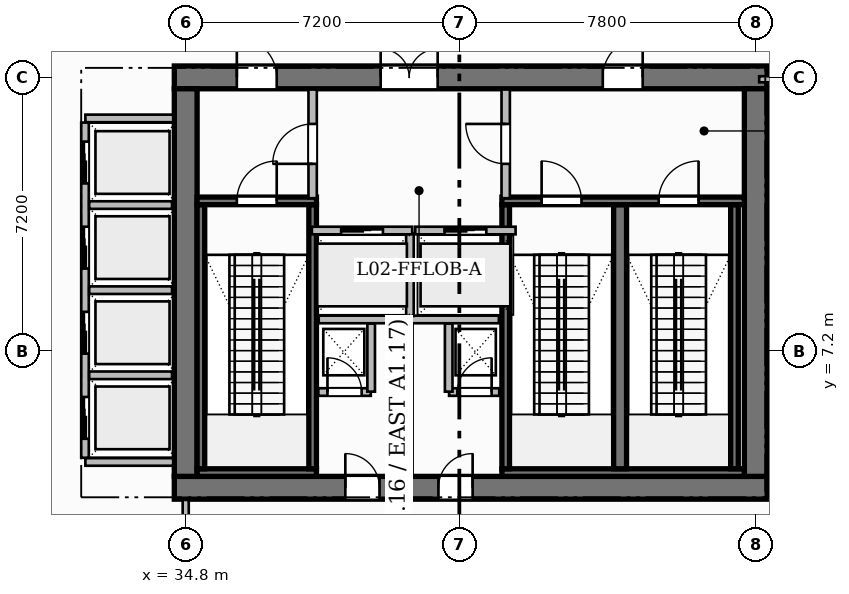
"""IFC4 building model, lengths in metres.
Left out: names, types, materials, properties, quantities, classifications, styles, units other than length and angle.
Written with IfcOpenShell. Run it as: python <this file> out.ifc"""

import sys

from ifc_helpers import new_model, si_unit, direction, frame, frame_2d, origin, place, context, subcontext, project, spatial, rectangle, extrude, source, transform, mapped, element, fill, save


model = new_model("IFC4")
c1 = context("Model", 3, precision=1e-05, world=origin(), true_north=direction((0.0, 1.0)))
c2 = subcontext(c1, "Body", "Model", "MODEL_VIEW")
j1 = project(units=[si_unit("LENGTHUNIT", "METRE"), si_unit("PLANEANGLEUNIT", "RADIAN")], contexts=[c1])
p1 = place(None, origin())
s1 = spatial("IfcSite", under=j1, at=p1, CompositionType="ELEMENT")
p2 = place(p1, origin())
s2 = spatial("IfcBuilding", under=s1, at=p2, CompositionType="ELEMENT")
p3 = place(p2, frame((0.0, 0.0, 10.8)))
s3 = spatial("IfcBuildingStorey", under=s2, at=p3, CompositionType="ELEMENT", Elevation=10.8)
p4 = place(p3, frame((34.5, 3.6, 0.0), z_axis=(0.0, 0.0, 1.0), x_axis=(1.0, 0.0, 0.0)))
e1 = element("IfcWall", 1, at=p4, inside=s3, PredefinedType="SHEAR", context=c2, shape_type="SweptSolid", body=[
    extrude(rectangle(XDim=15.6, YDim=0.6, at=frame_2d((7.8, 0.0))), origin(), (0.0, 0.0, 1.0), 5.4),
])
p5 = place(p4, frame((4.5, 0.0, 0.0)))
e2 = element("IfcOpeningElement", 2, at=p5, cuts=e1, PredefinedType="OPENING", context=c2, shape_type="SweptSolid", body=[
    extrude(rectangle(XDim=0.9, YDim=2.1, at=frame_2d((0.45, 1.05))), frame((0.0, 0.31, 0.0), z_axis=(0.0, -1.0, 0.0), x_axis=(1.0, 0.0, 0.0)), (0.0, 0.0, 1.0), 0.62),
])
p6 = place(p4, frame((6.95, 0.0, 0.0)))
e3 = element("IfcOpeningElement", 3, at=p6, cuts=e1, PredefinedType="OPENING", context=c2, shape_type="SweptSolid", body=[
    extrude(rectangle(XDim=0.9, YDim=2.1, at=frame_2d((0.45, 1.05))), frame((0.0, 0.31, 0.0), z_axis=(0.0, -1.0, 0.0), x_axis=(1.0, 0.0, 0.0)), (0.0, 0.0, 1.0), 0.62),
])
p7 = place(p3, frame((34.5, 14.4, 0.0), z_axis=(0.0, 0.0, 1.0), x_axis=(1.0, 0.0, 0.0)))
e4 = element("IfcWall", 4, at=p7, inside=s3, PredefinedType="SHEAR", context=c2, shape_type="SweptSolid", body=[
    extrude(rectangle(XDim=15.6, YDim=0.6, at=frame_2d((7.8, 0.0))), origin(), (0.0, 0.0, 1.0), 5.4),
])
p8 = place(p7, frame((5.43, 0.0, 0.0)))
e5 = element("IfcOpeningElement", 5, at=p8, cuts=e4, PredefinedType="OPENING", context=c2, shape_type="SweptSolid", body=[
    extrude(rectangle(XDim=1.5, YDim=2.2, at=frame_2d((0.75, 1.1))), frame((0.0, 0.31, 0.0), z_axis=(0.0, -1.0, 0.0), x_axis=(1.0, 0.0, 0.0)), (0.0, 0.0, 1.0), 0.62),
])
p9 = place(p7, frame((1.645, 0.0, 0.0)))
e6 = element("IfcOpeningElement", 6, at=p9, cuts=e4, PredefinedType="OPENING", context=c2, shape_type="SweptSolid", body=[
    extrude(rectangle(XDim=1.05, YDim=2.15, at=frame_2d((0.525, 1.075))), frame((0.0, 0.31, 0.0), z_axis=(0.0, -1.0, 0.0), x_axis=(1.0, 0.0, 0.0)), (0.0, 0.0, 1.0), 0.62),
])
p10 = place(p7, frame((11.275, 0.0, 0.0)))
e7 = element("IfcOpeningElement", 7, at=p10, cuts=e4, PredefinedType="OPENING", context=c2, shape_type="SweptSolid", body=[
    extrude(rectangle(XDim=1.05, YDim=2.15, at=frame_2d((0.525, 1.075))), frame((0.0, 0.31, 0.0), z_axis=(0.0, -1.0, 0.0), x_axis=(1.0, 0.0, 0.0)), (0.0, 0.0, 1.0), 0.62),
])
for number, where, z_axis, x_axis in (
    (8, (34.8, 3.9, 0.0), (0.0, 0.0, 1.0), (0.0, 1.0, 0.0)),
    (9, (49.8, 3.9, 0.0), (0.0, 0.0, 1.0), (0.0, 1.0, 0.0)),
):
    element("IfcWall", number, at=place(p3, frame(where, z_axis=z_axis, x_axis=x_axis)), inside=s3, PredefinedType="SHEAR", context=c2, shape_type="SweptSolid", body=[
        extrude(rectangle(XDim=10.2, YDim=0.6, at=frame_2d((5.1, 0.0))), origin(), (0.0, 0.0, 1.0), 5.4),
    ])
p11 = place(p3, frame((35.1, 4.0, 0.0), z_axis=(0.0, 0.0, 1.0), x_axis=(1.0, 0.0, 0.0)))
e10 = element("IfcWall", 10, at=p11, inside=s3, PredefinedType="SHEAR", context=c2, shape_type="SweptSolid", body=[
    extrude(rectangle(XDim=3.14, YDim=0.2, at=frame_2d((1.57, 0.0))), origin(), (0.0, 0.0, 1.0), 5.4),
])
for number, where, z_axis, x_axis in (
    (11, (35.2, 4.1, 0.0), (0.0, 0.0, 1.0), (0.0, 1.0, 0.0)),
    (12, (38.14, 4.1, 0.0), (0.0, 0.0, 1.0), (0.0, 1.0, 0.0)),
):
    element("IfcWall", number, at=place(p3, frame(where, z_axis=z_axis, x_axis=x_axis)), inside=s3, PredefinedType="SHEAR", context=c2, shape_type="SweptSolid", body=[
        extrude(rectangle(XDim=6.95, YDim=0.2, at=frame_2d((3.475, 0.0))), origin(), (0.0, 0.0, 1.0), 5.4),
    ])
p12 = place(p3, frame((35.1, 11.15, 0.0), z_axis=(0.0, 0.0, 1.0), x_axis=(1.0, 0.0, 0.0)))
e13 = element("IfcWall", 13, at=p12, inside=s3, PredefinedType="SHEAR", context=c2, shape_type="SweptSolid", body=[
    extrude(rectangle(XDim=3.14, YDim=0.2, at=frame_2d((1.57, 0.0))), origin(), (0.0, 0.0, 1.0), 5.4),
])
p13 = place(p12, frame((1.045, 0.0, 0.0)))
e14 = element("IfcOpeningElement", 14, at=p13, cuts=e13, PredefinedType="OPENING", context=c2, shape_type="SweptSolid", body=[
    extrude(rectangle(XDim=1.05, YDim=2.2, at=frame_2d((0.525, 1.1))), frame((0.0, 0.11, 0.0), z_axis=(0.0, -1.0, 0.0), x_axis=(1.0, 0.0, 0.0)), (0.0, 0.0, 1.0), 0.22),
])
p14 = place(p3, frame((43.12, 4.0, 0.0), z_axis=(0.0, 0.0, 1.0), x_axis=(1.0, 0.0, 0.0)))
e15 = element("IfcWall", 15, at=p14, inside=s3, PredefinedType="SHEAR", context=c2, shape_type="SweptSolid", body=[
    extrude(rectangle(XDim=6.38, YDim=0.2, at=frame_2d((3.19, 0.0))), origin(), (0.0, 0.0, 1.0), 5.4),
])
p15 = place(p3, frame((43.22, 4.1, 0.0), z_axis=(0.0, 0.0, 1.0), x_axis=(0.0, 1.0, 0.0)))
e16 = element("IfcWall", 16, at=p15, inside=s3, PredefinedType="SHEAR", context=c2, shape_type="SweptSolid", body=[
    extrude(rectangle(XDim=6.95, YDim=0.2, at=frame_2d((3.475, 0.0))), origin(), (0.0, 0.0, 1.0), 5.4),
])
p16 = place(p3, frame((46.23, 4.1, 0.0), z_axis=(0.0, 0.0, 1.0), x_axis=(0.0, 1.0, 0.0)))
e17 = element("IfcWall", 17, at=p16, inside=s3, PredefinedType="SHEAR", context=c2, shape_type="SweptSolid", body=[
    extrude(rectangle(XDim=6.95, YDim=0.34, at=frame_2d((3.475, 0.0))), origin(), (0.0, 0.0, 1.0), 5.4),
])
p17 = place(p3, frame((49.24, 4.1, 0.0), z_axis=(0.0, 0.0, 1.0), x_axis=(0.0, 1.0, 0.0)))
e18 = element("IfcWall", 18, at=p17, inside=s3, PredefinedType="SHEAR", context=c2, shape_type="SweptSolid", body=[
    extrude(rectangle(XDim=6.95, YDim=0.2, at=frame_2d((3.475, 0.0))), origin(), (0.0, 0.0, 1.0), 5.4),
])
p18 = place(p3, frame((43.12, 11.15, 0.0), z_axis=(0.0, 0.0, 1.0), x_axis=(1.0, 0.0, 0.0)))
e19 = element("IfcWall", 19, at=p18, inside=s3, PredefinedType="SHEAR", context=c2, shape_type="SweptSolid", body=[
    extrude(rectangle(XDim=6.38, YDim=0.2, at=frame_2d((3.19, 0.0))), origin(), (0.0, 0.0, 1.0), 5.4),
])
p19 = place(p18, frame((1.045, 0.0, 0.0)))
e20 = element("IfcOpeningElement", 20, at=p19, cuts=e19, PredefinedType="OPENING", context=c2, shape_type="SweptSolid", body=[
    extrude(rectangle(XDim=1.05, YDim=2.2, at=frame_2d((0.525, 1.1))), frame((0.0, 0.11, 0.0), z_axis=(0.0, -1.0, 0.0), x_axis=(1.0, 0.0, 0.0)), (0.0, 0.0, 1.0), 0.22),
])
p20 = place(p18, frame((4.125, 0.0, 0.0)))
e21 = element("IfcOpeningElement", 21, at=p20, cuts=e19, PredefinedType="OPENING", context=c2, shape_type="SweptSolid", body=[
    extrude(rectangle(XDim=1.05, YDim=2.2, at=frame_2d((0.525, 1.1))), frame((0.0, 0.11, 0.0), z_axis=(0.0, -1.0, 0.0), x_axis=(1.0, 0.0, 0.0)), (0.0, 0.0, 1.0), 0.22),
])
p21 = place(p3, frame((38.3, 8.03, 0.0), z_axis=(0.0, 0.0, 1.0), x_axis=(1.0, 0.0, 0.0)))
e22 = element("IfcWall", 22, at=p21, inside=s3, PredefinedType="PARTITIONING", context=c2, shape_type="SweptSolid", body=[
    extrude(rectangle(XDim=4.74, YDim=0.2, at=frame_2d((2.37, 0.0))), origin(), (0.0, 0.0, 1.0), 5.1),
])
p22 = place(p3, frame((40.7, 8.12, 0.0), z_axis=(0.0, 0.0, 1.0), x_axis=(0.0, 1.0, 0.0)))
e23 = element("IfcWall", 23, at=p22, inside=s3, PredefinedType="PARTITIONING", context=c2, shape_type="SweptSolid", body=[
    extrude(rectangle(XDim=2.18, YDim=0.2, at=frame_2d((1.09, 0.0))), origin(), (0.0, 0.0, 1.0), 5.1),
])
p23 = place(p3, frame((38.14, 11.22, 0.0), z_axis=(0.0, 0.0, 1.0), x_axis=(0.0, 1.0, 0.0)))
e24 = element("IfcWall", 24, at=p23, inside=s3, PredefinedType="PARTITIONING", context=c2, shape_type="SweptSolid", body=[
    extrude(rectangle(XDim=2.86, YDim=0.22, at=frame_2d((1.43, 0.0))), origin(), (0.0, 0.0, 1.0), 5.1),
])
p24 = place(p23, frame((0.905, 0.0, 0.0)))
e25 = element("IfcOpeningElement", 25, at=p24, cuts=e24, PredefinedType="OPENING", context=c2, shape_type="SweptSolid", body=[
    extrude(rectangle(XDim=1.05, YDim=2.15, at=frame_2d((0.525, 1.075))), frame((0.0, 0.12, 0.0), z_axis=(0.0, -1.0, 0.0), x_axis=(1.0, 0.0, 0.0)), (0.0, 0.0, 1.0), 0.24),
])
p25 = place(p3, frame((43.22, 11.22, 0.0), z_axis=(0.0, 0.0, 1.0), x_axis=(0.0, 1.0, 0.0)))
e26 = element("IfcWall", 26, at=p25, inside=s3, PredefinedType="PARTITIONING", context=c2, shape_type="SweptSolid", body=[
    extrude(rectangle(XDim=2.86, YDim=0.22, at=frame_2d((1.43, 0.0))), origin(), (0.0, 0.0, 1.0), 5.1),
])
p26 = place(p25, frame((0.905, 0.0, 0.0)))
e27 = element("IfcOpeningElement", 27, at=p26, cuts=e26, PredefinedType="OPENING", context=c2, shape_type="SweptSolid", body=[
    extrude(rectangle(XDim=1.05, YDim=2.15, at=frame_2d((0.525, 1.075))), frame((0.0, 0.12, 0.0), z_axis=(0.0, -1.0, 0.0), x_axis=(1.0, 0.0, 0.0)), (0.0, 0.0, 1.0), 0.24),
])
p27 = place(p3, frame((38.29, 6.12, 0.0), z_axis=(0.0, 0.0, 1.0), x_axis=(1.0, 0.0, 0.0)))
e28 = element("IfcWall", 28, at=p27, inside=s3, PredefinedType="PARTITIONING", context=c2, shape_type="SweptSolid", body=[
    extrude(rectangle(XDim=1.38, YDim=0.2, at=frame_2d((0.69, 0.0))), origin(), (0.0, 0.0, 1.0), 5.1),
])
p28 = place(p27, frame((0.24, 0.0, 0.0)))
e29 = element("IfcOpeningElement", 29, at=p28, cuts=e28, PredefinedType="OPENING", context=c2, shape_type="SweptSolid", body=[
    extrude(rectangle(XDim=0.9, YDim=2.1, at=frame_2d((0.45, 1.05))), frame((0.0, 0.11, 0.0), z_axis=(0.0, -1.0, 0.0), x_axis=(1.0, 0.0, 0.0)), (0.0, 0.0, 1.0), 0.22),
])
p29 = place(p3, frame((39.68, 6.13, 0.0), z_axis=(0.0, 0.0, 1.0), x_axis=(0.0, 1.0, 0.0)))
e30 = element("IfcWall", 30, at=p29, inside=s3, PredefinedType="PARTITIONING", context=c2, shape_type="SweptSolid", body=[
    extrude(rectangle(XDim=1.79, YDim=0.2, at=frame_2d((0.895, 0.0))), origin(), (0.0, 0.0, 1.0), 5.1),
])
p30 = place(p3, frame((41.73, 6.12, 0.0), z_axis=(0.0, 0.0, 1.0), x_axis=(1.0, 0.0, 0.0)))
e31 = element("IfcWall", 31, at=p30, inside=s3, PredefinedType="PARTITIONING", context=c2, shape_type="SweptSolid", body=[
    extrude(rectangle(XDim=1.32, YDim=0.2, at=frame_2d((0.66, 0.0))), origin(), (0.0, 0.0, 1.0), 5.1),
])
p31 = place(p30, frame((0.22, 0.0, 0.0)))
e32 = element("IfcOpeningElement", 32, at=p31, cuts=e31, PredefinedType="OPENING", context=c2, shape_type="SweptSolid", body=[
    extrude(rectangle(XDim=0.9, YDim=2.1, at=frame_2d((0.45, 1.05))), frame((0.0, 0.11, 0.0), z_axis=(0.0, -1.0, 0.0), x_axis=(1.0, 0.0, 0.0)), (0.0, 0.0, 1.0), 0.22),
])
p32 = place(p3, frame((41.72, 6.13, 0.0), z_axis=(0.0, 0.0, 1.0), x_axis=(0.0, 1.0, 0.0)))
e33 = element("IfcWall", 33, at=p32, inside=s3, PredefinedType="PARTITIONING", context=c2, shape_type="SweptSolid", body=[
    extrude(rectangle(XDim=1.79, YDim=0.2, at=frame_2d((0.895, 0.0))), origin(), (0.0, 0.0, 1.0), 5.1),
])
p33 = place(p3, frame((40.7, 3.92, 0.0), z_axis=(0.0, 0.0, 1.0), x_axis=(0.0, 1.0, 0.0)))
e34 = element("IfcWall", 34, at=p33, inside=s3, PredefinedType="PARTITIONING", context=c2, shape_type="SweptSolid", body=[
    extrude(rectangle(XDim=3.99, YDim=0.14, at=frame_2d((1.995, 0.0))), origin(), (0.0, 0.0, 1.0), 5.1),
])
for number, where, z_axis, x_axis in (
    (35, (32.16, 4.28, 0.0), (0.0, 0.0, 1.0), (1.0, 0.0, 0.0)),
    (36, (32.16, 13.32, 0.0), (0.0, 0.0, 1.0), (1.0, 0.0, 0.0)),
):
    element("IfcWall", number, at=place(p3, frame(where, z_axis=z_axis, x_axis=x_axis)), inside=s3, PredefinedType="PARTITIONING", context=c2, shape_type="SweptSolid", body=[
        extrude(rectangle(XDim=2.31, YDim=0.2, at=frame_2d((1.155, 0.0))), origin(), (0.0, 0.0, 1.0), 5.1),
    ])
p34 = place(p3, frame((32.15, 4.39, 0.0), z_axis=(0.0, 0.0, 1.0), x_axis=(0.0, 1.0, 0.0)))
e37 = element("IfcWall", 37, at=p34, inside=s3, PredefinedType="PARTITIONING", context=c2, shape_type="SweptSolid", body=[
    extrude(rectangle(XDim=8.82, YDim=0.2, at=frame_2d((4.41, 0.0))), origin(), (0.0, 0.0, 1.0), 5.1),
])
p35 = place(p34, frame((0.5, 0.0, 0.0)))
e38 = element("IfcOpeningElement", 38, at=p35, cuts=e37, PredefinedType="OPENING", context=c2, shape_type="SweptSolid", body=[
    extrude(rectangle(XDim=1.1, YDim=2.2, at=frame_2d((0.55, 1.1))), frame((0.0, 0.11, 0.0), z_axis=(0.0, -1.0, 0.0), x_axis=(1.0, 0.0, 0.0)), (0.0, 0.0, 1.0), 0.22),
])
p36 = place(p34, frame((2.74, 0.0, 0.0)))
e39 = element("IfcOpeningElement", 39, at=p36, cuts=e37, PredefinedType="OPENING", context=c2, shape_type="SweptSolid", body=[
    extrude(rectangle(XDim=1.1, YDim=2.2, at=frame_2d((0.55, 1.1))), frame((0.0, 0.11, 0.0), z_axis=(0.0, -1.0, 0.0), x_axis=(1.0, 0.0, 0.0)), (0.0, 0.0, 1.0), 0.22),
])
p37 = place(p34, frame((4.98, 0.0, 0.0)))
e40 = element("IfcOpeningElement", 40, at=p37, cuts=e37, PredefinedType="OPENING", context=c2, shape_type="SweptSolid", body=[
    extrude(rectangle(XDim=1.1, YDim=2.2, at=frame_2d((0.55, 1.1))), frame((0.0, 0.11, 0.0), z_axis=(0.0, -1.0, 0.0), x_axis=(1.0, 0.0, 0.0)), (0.0, 0.0, 1.0), 0.22),
])
p38 = place(p34, frame((7.22, 0.0, 0.0)))
e41 = element("IfcOpeningElement", 41, at=p38, cuts=e37, PredefinedType="OPENING", context=c2, shape_type="SweptSolid", body=[
    extrude(rectangle(XDim=1.1, YDim=2.2, at=frame_2d((0.55, 1.1))), frame((0.0, 0.11, 0.0), z_axis=(0.0, -1.0, 0.0), x_axis=(1.0, 0.0, 0.0)), (0.0, 0.0, 1.0), 0.22),
])
for number, where, z_axis, x_axis in (
    (42, (32.26, 6.56, 0.0), (0.0, 0.0, 1.0), (1.0, 0.0, 0.0)),
    (43, (32.26, 8.8, 0.0), (0.0, 0.0, 1.0), (1.0, 0.0, 0.0)),
    (44, (32.26, 11.04, 0.0), (0.0, 0.0, 1.0), (1.0, 0.0, 0.0)),
):
    element("IfcWall", number, at=place(p3, frame(where, z_axis=z_axis, x_axis=x_axis)), inside=s3, PredefinedType="PARTITIONING", context=c2, shape_type="SweptSolid", body=[
        extrude(rectangle(XDim=2.18, YDim=0.2, at=frame_2d((1.09, 0.0))), origin(), (0.0, 0.0, 1.0), 5.1),
    ])
p39 = place(p3, frame((34.8, 0.32, 0.0), z_axis=(0.0, 0.0, 1.0), x_axis=(0.0, 1.0, 0.0)))
e45 = element("IfcWall", 45, at=p39, inside=s3, PredefinedType="PARTITIONING", context=c2, shape_type="SweptSolid", body=[
    extrude(rectangle(XDim=2.96, YDim=0.16, at=frame_2d((1.48, 0.0))), origin(), (0.0, 0.0, 1.0), 5.1),
])
p40 = place(p39, frame((0.955, 0.0, 0.0)))
e46 = element("IfcOpeningElement", 46, at=p40, cuts=e45, PredefinedType="OPENING", context=c2, shape_type="SweptSolid", body=[
    extrude(rectangle(XDim=1.05, YDim=2.15, at=frame_2d((0.525, 1.075))), frame((0.0, 0.09, 0.0), z_axis=(0.0, -1.0, 0.0), x_axis=(1.0, 0.0, 0.0)), (0.0, 0.0, 1.0), 0.18),
])
p41 = place(p3, frame((49.89, 14.35, 0.0), z_axis=(0.0, 0.0, 1.0), x_axis=(1.0, 0.0, 0.0)))
e47 = element("IfcWall", 47, at=p41, inside=s3, PredefinedType="PARTITIONING", context=c2, shape_type="SweptSolid", body=[
    extrude(rectangle(XDim=30.342, YDim=0.16, at=frame_2d((15.171, 0.0))), origin(), (0.0, 0.0, 1.0), 4.185),
])
p42 = place(p41, frame((13.31, 0.0, 0.0)))
e48 = element("IfcOpeningElement", 48, at=p42, cuts=e47, PredefinedType="OPENING", context=c2, shape_type="SweptSolid", body=[
    extrude(rectangle(XDim=1.6, YDim=2.4, at=frame_2d((0.8, 1.2))), frame((0.0, 0.09, 0.0), z_axis=(0.0, -1.0, 0.0), x_axis=(1.0, 0.0, 0.0)), (0.0, 0.0, 1.0), 0.18),
])
p43 = place(p3, frame((38.12, 10.37, 0.0), z_axis=(0.0, 0.0, 1.0), x_axis=(1.0, 0.0, 0.0)))
e49 = element("IfcWall", 49, at=p43, inside=s3, PredefinedType="PARTITIONING", context=c2, shape_type="SweptSolid", body=[
    extrude(rectangle(XDim=2.64, YDim=0.2, at=frame_2d((1.32, 0.0))), origin(), (0.0, 0.0, 1.0), 5.1),
])
p44 = place(p43, frame((0.77, 0.0, 0.0)))
e50 = element("IfcOpeningElement", 50, at=p44, cuts=e49, PredefinedType="OPENING", context=c2, shape_type="SweptSolid", body=[
    extrude(rectangle(XDim=1.1, YDim=2.2, at=frame_2d((0.55, 1.1))), frame((0.0, 0.11, 0.0), z_axis=(0.0, -1.0, 0.0), x_axis=(1.0, 0.0, 0.0)), (0.0, 0.0, 1.0), 0.22),
])
p45 = place(p3, frame((40.84, 10.37, 0.0), z_axis=(0.0, 0.0, 1.0), x_axis=(1.0, 0.0, 0.0)))
e51 = element("IfcWall", 51, at=p45, inside=s3, PredefinedType="PARTITIONING", context=c2, shape_type="SweptSolid", body=[
    extrude(rectangle(XDim=2.64, YDim=0.2, at=frame_2d((1.32, 0.0))), origin(), (0.0, 0.0, 1.0), 5.1),
])
p46 = place(p45, frame((0.77, 0.0, 0.0)))
e52 = element("IfcOpeningElement", 52, at=p46, cuts=e51, PredefinedType="OPENING", context=c2, shape_type="SweptSolid", body=[
    extrude(rectangle(XDim=1.1, YDim=2.2, at=frame_2d((0.55, 1.1))), frame((0.0, 0.11, 0.0), z_axis=(0.0, -1.0, 0.0), x_axis=(1.0, 0.0, 0.0)), (0.0, 0.0, 1.0), 0.22),
])
m1 = source(origin(), c2, "Body", "SweptSolid", [
    extrude(rectangle(XDim=1.05, YDim=2.2, at=frame_2d((0.525, 1.1))), frame((0.0, 0.025, 0.0), z_axis=(0.0, -1.0, 0.0), x_axis=(1.0, 0.0, 0.0)), (0.0, 0.0, 1.0), 0.05),
])
p47 = place(p13, origin())
e53 = element("IfcDoor", 53, at=p47, inside=s3, OperationType="SINGLE_SWING_RIGHT", PredefinedType="DOOR", context=c2, shape_type="MappedRepresentation", body=[
    mapped(m1, transform((0.0, 0.0, 0.0), scale=1.0)),
])
fill(e14, e53)
p48 = place(p19, origin())
e54 = element("IfcDoor", 54, at=p48, inside=s3, OperationType="SINGLE_SWING_LEFT", PredefinedType="DOOR", context=c2, shape_type="MappedRepresentation", body=[
    mapped(m1, transform((0.0, 0.0, 0.0), scale=1.0)),
])
fill(e20, e54)
p49 = place(p20, origin())
e55 = element("IfcDoor", 55, at=p49, inside=s3, OperationType="SINGLE_SWING_RIGHT", PredefinedType="DOOR", context=c2, shape_type="MappedRepresentation", body=[
    mapped(m1, transform((0.0, 0.0, 0.0), scale=1.0)),
])
fill(e21, e55)
m2 = source(origin(), c2, "Body", "SweptSolid", [
    extrude(rectangle(XDim=1.05, YDim=2.15, at=frame_2d((0.525, 1.075))), frame((0.0, 0.025, 0.0), z_axis=(0.0, -1.0, 0.0), x_axis=(1.0, 0.0, 0.0)), (0.0, 0.0, 1.0), 0.05),
])
p50 = place(p24, origin())
e56 = element("IfcDoor", 56, at=p50, inside=s3, OperationType="SINGLE_SWING_LEFT", PredefinedType="DOOR", context=c2, shape_type="MappedRepresentation", body=[
    mapped(m2, transform((0.0, 0.0, 0.0), scale=1.0)),
])
fill(e25, e56)
p51 = place(p26, origin())
e57 = element("IfcDoor", 57, at=p51, inside=s3, OperationType="SINGLE_SWING_RIGHT", PredefinedType="DOOR", context=c2, shape_type="MappedRepresentation", body=[
    mapped(m2, transform((0.0, 0.0, 0.0), scale=1.0)),
])
fill(e27, e57)
m3 = source(origin(), c2, "Body", "SweptSolid", [
    extrude(rectangle(XDim=1.5, YDim=2.2, at=frame_2d((0.75, 1.1))), frame((0.0, 0.025, 0.0), z_axis=(0.0, -1.0, 0.0), x_axis=(1.0, 0.0, 0.0)), (0.0, 0.0, 1.0), 0.05),
])
p52 = place(p8, origin())
e58 = element("IfcDoor", 58, at=p52, inside=s3, OperationType="DOUBLE_DOOR_SINGLE_SWING", PredefinedType="DOOR", context=c2, shape_type="MappedRepresentation", body=[
    mapped(m3, transform((0.0, 0.0, 0.0), scale=1.0)),
])
fill(e5, e58)
p53 = place(p9, origin())
e59 = element("IfcDoor", 59, at=p53, inside=s3, OperationType="SINGLE_SWING_LEFT", PredefinedType="DOOR", context=c2, shape_type="MappedRepresentation", body=[
    mapped(m2, transform((0.0, 0.0, 0.0), scale=1.0)),
])
fill(e6, e59)
p54 = place(p10, origin())
e60 = element("IfcDoor", 60, at=p54, inside=s3, OperationType="SINGLE_SWING_RIGHT", PredefinedType="DOOR", context=c2, shape_type="MappedRepresentation", body=[
    mapped(m2, transform((0.0, 0.0, 0.0), scale=1.0)),
])
fill(e7, e60)
m4 = source(origin(), c2, "Body", "SweptSolid", [
    extrude(rectangle(XDim=0.9, YDim=2.1, at=frame_2d((0.45, 1.05))), frame((0.0, 0.025, 0.0), z_axis=(0.0, -1.0, 0.0), x_axis=(1.0, 0.0, 0.0)), (0.0, 0.0, 1.0), 0.05),
])
p55 = place(p28, origin())
e61 = element("IfcDoor", 61, at=p55, inside=s3, OperationType="SINGLE_SWING_LEFT", PredefinedType="DOOR", context=c2, shape_type="MappedRepresentation", body=[
    mapped(m4, transform((0.0, 0.0, 0.0), scale=1.0)),
])
fill(e29, e61)
p56 = place(p31, origin())
e62 = element("IfcDoor", 62, at=p56, inside=s3, OperationType="SINGLE_SWING_RIGHT", PredefinedType="DOOR", context=c2, shape_type="MappedRepresentation", body=[
    mapped(m4, transform((0.0, 0.0, 0.0), scale=1.0)),
])
fill(e32, e62)
p57 = place(p5, origin())
e63 = element("IfcDoor", 63, at=p57, inside=s3, OperationType="SINGLE_SWING_LEFT", PredefinedType="DOOR", context=c2, shape_type="MappedRepresentation", body=[
    mapped(m4, transform((0.0, 0.0, 0.0), scale=1.0)),
])
fill(e2, e63)
p58 = place(p6, origin())
e64 = element("IfcDoor", 64, at=p58, inside=s3, OperationType="SINGLE_SWING_RIGHT", PredefinedType="DOOR", context=c2, shape_type="MappedRepresentation", body=[
    mapped(m4, transform((0.0, 0.0, 0.0), scale=1.0)),
])
fill(e3, e64)
m5 = source(origin(), c2, "Body", "SweptSolid", [
    extrude(rectangle(XDim=1.1, YDim=2.2, at=frame_2d((0.55, 1.1))), frame((0.0, 0.025, 0.0), z_axis=(0.0, -1.0, 0.0), x_axis=(1.0, 0.0, 0.0)), (0.0, 0.0, 1.0), 0.05),
])
p59 = place(p44, origin())
e65 = element("IfcDoor", 65, at=p59, inside=s3, OperationType="SLIDING_TO_LEFT", PredefinedType="DOOR", context=c2, shape_type="MappedRepresentation", body=[
    mapped(m5, transform((0.0, 0.0, 0.0), scale=1.0)),
])
fill(e50, e65)
p60 = place(p46, origin())
e66 = element("IfcDoor", 66, at=p60, inside=s3, OperationType="SLIDING_TO_LEFT", PredefinedType="DOOR", context=c2, shape_type="MappedRepresentation", body=[
    mapped(m5, transform((0.0, 0.0, 0.0), scale=1.0)),
])
fill(e52, e66)
p61 = place(p35, origin())
e67 = element("IfcDoor", 67, at=p61, inside=s3, OperationType="SLIDING_TO_LEFT", PredefinedType="DOOR", context=c2, shape_type="MappedRepresentation", body=[
    mapped(m5, transform((0.0, 0.0, 0.0), scale=1.0)),
])
fill(e38, e67)
p62 = place(p36, origin())
e68 = element("IfcDoor", 68, at=p62, inside=s3, OperationType="SLIDING_TO_LEFT", PredefinedType="DOOR", context=c2, shape_type="MappedRepresentation", body=[
    mapped(m5, transform((0.0, 0.0, 0.0), scale=1.0)),
])
fill(e39, e68)
p63 = place(p37, origin())
e69 = element("IfcDoor", 69, at=p63, inside=s3, OperationType="SLIDING_TO_LEFT", PredefinedType="DOOR", context=c2, shape_type="MappedRepresentation", body=[
    mapped(m5, transform((0.0, 0.0, 0.0), scale=1.0)),
])
fill(e40, e69)
p64 = place(p38, origin())
e70 = element("IfcDoor", 70, at=p64, inside=s3, OperationType="SLIDING_TO_LEFT", PredefinedType="DOOR", context=c2, shape_type="MappedRepresentation", body=[
    mapped(m5, transform((0.0, 0.0, 0.0), scale=1.0)),
])
fill(e41, e70)
save(model, sys.argv[1])
